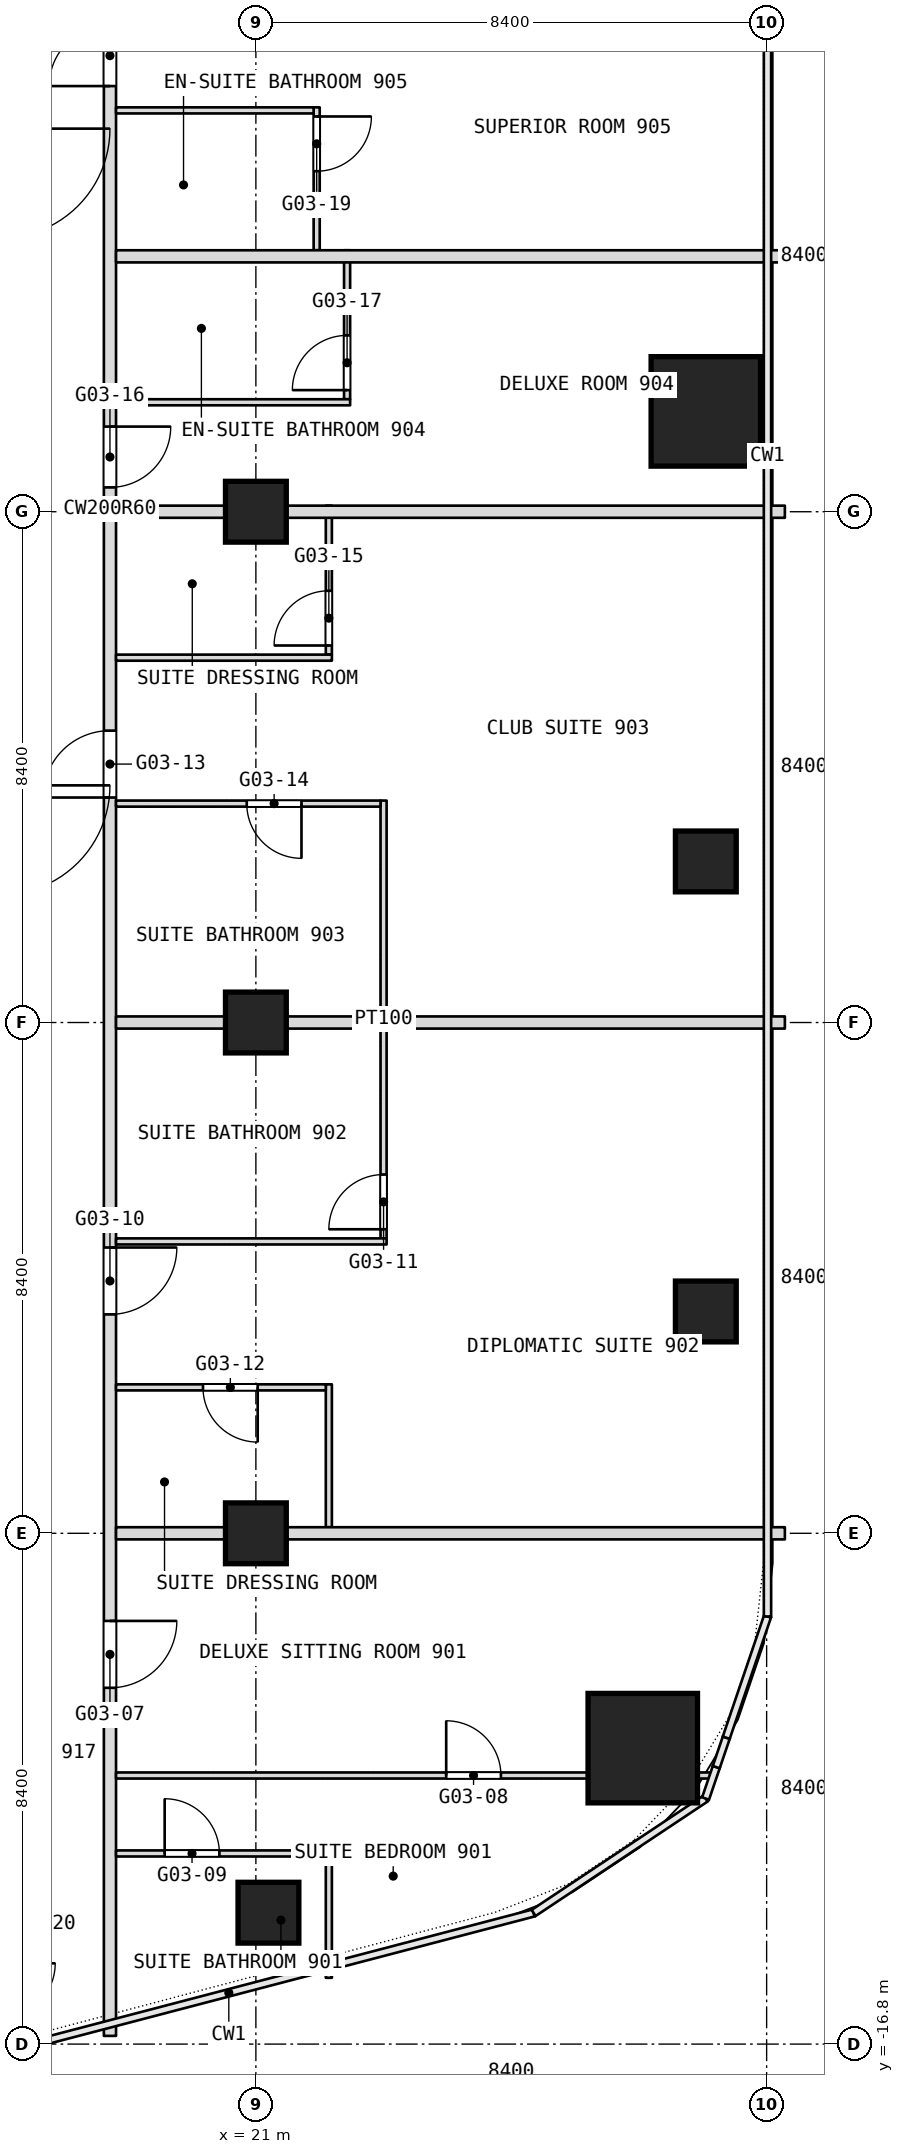
"""IFC4 building model, lengths in metres.
Left out: names, types, materials, properties, quantities, classifications, styles, units other than length and angle.
Written with IfcOpenShell. Run it as: python <this file> out.ifc"""

import sys

from ifc_helpers import new_model, si_unit, direction, frame, frame_2d, origin, origin_2d, place, context, subcontext, project, spatial, rectangle, extrude, element, fill, save


model = new_model("IFC4")
c1 = context("Model", 3, precision=1e-05, world=origin(), true_north=direction((0.0, 1.0)))
c2 = subcontext(c1, "Body", "Model", "MODEL_VIEW")
j1 = project(units=[si_unit("LENGTHUNIT", "METRE"), si_unit("PLANEANGLEUNIT", "RADIAN")], contexts=[c1])
p1 = place(None, origin())
s1 = spatial("IfcSite", under=j1, at=p1, CompositionType="ELEMENT")
p2 = place(p1, origin())
s2 = spatial("IfcBuilding", under=s1, at=p2, CompositionType="ELEMENT")
p3 = place(p2, frame((0.0, 0.0, 47.3)))
s3 = spatial("IfcBuildingStorey", under=s2, at=p3, CompositionType="ELEMENT", Elevation=47.3)
for number, where, z_axis, x_axis in (
    (1, (27.363, -11.933, 0.0), (0.0, 0.0, 1.0), (1.0, 0.0, 0.0)),
    (2, (28.4, 10.05, 0.0), (0.0, 0.0, 1.0), (1.0, 0.0, 0.0)),
):
    element("IfcColumn", number, at=place(p3, frame(where, z_axis=z_axis, x_axis=x_axis)), inside=s3, PredefinedType="COLUMN", context=c2, shape_type="SweptSolid", body=[
        extrude(rectangle(XDim=1.8, YDim=1.8, at=origin_2d()), origin(), (0.0, 0.0, 1.0), 3.6),
    ])
for number, where, z_axis, x_axis in (
    (3, (21.0, -8.4, 0.0), (0.0, 0.0, 1.0), (1.0, 0.0, 0.0)),
    (4, (21.0, 0.0, 0.0), (0.0, 0.0, 1.0), (1.0, 0.0, 0.0)),
    (5, (21.0, 8.4, 0.0), (0.0, 0.0, 1.0), (1.0, 0.0, 0.0)),
    (6, (28.4, 2.649, 0.0), (0.0, 0.0, 1.0), (1.0, 0.0, 0.0)),
    (7, (28.4, -4.752, 0.0), (0.0, 0.0, 1.0), (1.0, 0.0, 0.0)),
    (8, (21.207, -14.639, 0.0), (0.0, 0.0, 1.0), (1.0, 0.0, 0.0)),
):
    element("IfcColumn", number, at=place(p3, frame(where, z_axis=z_axis, x_axis=x_axis)), inside=s3, PredefinedType="COLUMN", context=c2, shape_type="SweptSolid", body=[
        extrude(rectangle(XDim=1.0, YDim=1.0, at=origin_2d()), origin(), (0.0, 0.0, 1.0), 3.6),
    ])
p4 = place(p3, frame((23.1, -3.55, 0.0), z_axis=(0.0, 0.0, 1.0), x_axis=(0.0, 1.0, 0.0)))
e9 = element("IfcWall", 9, at=p4, inside=s3, PredefinedType="PARTITIONING", context=c2, shape_type="SweptSolid", body=[
    extrude(rectangle(XDim=7.2, YDim=0.1, at=frame_2d((3.6, 0.0))), origin(), (0.0, 0.0, 1.0), 3.34),
])
p5 = place(p4, frame((0.15, 0.0, 0.0)))
e10 = element("IfcOpeningElement", 10, at=p5, cuts=e9, PredefinedType="OPENING", context=c2, shape_type="SweptSolid", body=[
    extrude(rectangle(XDim=0.9, YDim=2.1, at=frame_2d((0.45, 1.05))), frame((0.0, 0.05, 0.0), z_axis=(0.0, -1.0, 0.0), x_axis=(1.0, 0.0, 0.0)), (0.0, 0.0, 1.0), 0.1),
])
p6 = place(p3, frame((22.5, 10.25, 0.0), z_axis=(0.0, 0.0, 1.0), x_axis=(0.0, 1.0, 0.0)))
e11 = element("IfcWall", 11, at=p6, inside=s3, PredefinedType="PARTITIONING", context=c2, shape_type="SweptSolid", body=[
    extrude(rectangle(XDim=2.45, YDim=0.1, at=frame_2d((1.225, 0.0))), origin(), (0.0, 0.0, 1.0), 3.34),
])
p7 = place(p6, frame((0.15, 0.0, 0.0)))
e12 = element("IfcOpeningElement", 12, at=p7, cuts=e11, PredefinedType="OPENING", context=c2, shape_type="SweptSolid", body=[
    extrude(rectangle(XDim=0.9, YDim=2.1, at=frame_2d((0.45, 1.05))), frame((0.0, 0.05, 0.0), z_axis=(0.0, -1.0, 0.0), x_axis=(1.0, 0.0, 0.0)), (0.0, 0.0, 1.0), 0.1),
])
p8 = place(p3, frame((22.2, -15.71, 0.0), z_axis=(0.0, 0.0, 1.0), x_axis=(0.0, 1.0, 0.0)))
e13 = element("IfcWall", 13, at=p8, inside=s3, PredefinedType="PARTITIONING", context=c2, shape_type="SweptSolid", body=[
    extrude(rectangle(XDim=2.095, YDim=0.1, at=frame_2d((1.047, 0.0))), origin(), (0.0, 0.0, 1.0), 3.34),
])
p9 = place(p3, frame((22.2, -8.3, 0.0), z_axis=(0.0, 0.0, 1.0), x_axis=(0.0, 1.0, 0.0)))
e14 = element("IfcWall", 14, at=p9, inside=s3, PredefinedType="PARTITIONING", context=c2, shape_type="SweptSolid", body=[
    extrude(rectangle(XDim=2.35, YDim=0.1, at=frame_2d((1.175, 0.0))), origin(), (0.0, 0.0, 1.0), 3.34),
])
p10 = place(p3, frame((22.2, 6.05, 0.0), z_axis=(0.0, 0.0, 1.0), x_axis=(0.0, 1.0, 0.0)))
e15 = element("IfcWall", 15, at=p10, inside=s3, PredefinedType="PARTITIONING", context=c2, shape_type="SweptSolid", body=[
    extrude(rectangle(XDim=2.45, YDim=0.1, at=frame_2d((1.225, 0.0))), origin(), (0.0, 0.0, 1.0), 3.34),
])
p11 = place(p10, frame((0.15, 0.0, 0.0)))
e16 = element("IfcOpeningElement", 16, at=p11, cuts=e15, PredefinedType="OPENING", context=c2, shape_type="SweptSolid", body=[
    extrude(rectangle(XDim=0.9, YDim=2.1, at=frame_2d((0.45, 1.05))), frame((0.0, 0.05, 0.0), z_axis=(0.0, -1.0, 0.0), x_axis=(1.0, 0.0, 0.0)), (0.0, 0.0, 1.0), 0.1),
])
p12 = place(p3, frame((22.0, 12.7, 0.0), z_axis=(0.0, 0.0, 1.0), x_axis=(0.0, 1.0, 0.0)))
e17 = element("IfcWall", 17, at=p12, inside=s3, PredefinedType="PARTITIONING", context=c2, shape_type="SweptSolid", body=[
    extrude(rectangle(XDim=2.35, YDim=0.1, at=frame_2d((1.175, 0.0))), origin(), (0.0, 0.0, 1.0), 3.34),
])
p13 = place(p12, frame((1.3, 0.0, 0.0)))
e18 = element("IfcOpeningElement", 18, at=p13, cuts=e17, PredefinedType="OPENING", context=c2, shape_type="SweptSolid", body=[
    extrude(rectangle(XDim=0.9, YDim=2.1, at=frame_2d((0.45, 1.05))), frame((0.0, 0.05, 0.0), z_axis=(0.0, -1.0, 0.0), x_axis=(1.0, 0.0, 0.0)), (0.0, 0.0, 1.0), 0.1),
])
p14 = place(p3, frame((18.6, -16.665, 0.0), z_axis=(0.0, 0.0, 1.0), x_axis=(0.0, 1.0, 0.0)))
e19 = element("IfcWall", 19, at=p14, inside=s3, PredefinedType="PARTITIONING", context=c2, shape_type="SweptSolid", body=[
    extrude(rectangle(XDim=50.205, YDim=0.2, at=frame_2d((25.103, 0.0))), origin(), (0.0, 0.0, 1.0), 3.34),
])
p15 = place(p14, frame((5.724, 0.0, 0.0)))
e20 = element("IfcOpeningElement", 20, at=p15, cuts=e19, PredefinedType="OPENING", context=c2, shape_type="SweptSolid", body=[
    extrude(rectangle(XDim=1.1, YDim=2.1, at=frame_2d((0.55, 1.05))), frame((0.0, 0.1, 0.0), z_axis=(0.0, -1.0, 0.0), x_axis=(1.0, 0.0, 0.0)), (0.0, 0.0, 1.0), 0.2),
])
p16 = place(p14, frame((11.865, 0.0, 0.0)))
e21 = element("IfcOpeningElement", 21, at=p16, cuts=e19, PredefinedType="OPENING", context=c2, shape_type="SweptSolid", body=[
    extrude(rectangle(XDim=1.1, YDim=2.1, at=frame_2d((0.55, 1.05))), frame((0.0, 0.1, 0.0), z_axis=(0.0, -1.0, 0.0), x_axis=(1.0, 0.0, 0.0)), (0.0, 0.0, 1.0), 0.2),
])
p17 = place(p14, frame((20.365, 0.0, 0.0)))
e22 = element("IfcOpeningElement", 22, at=p17, cuts=e19, PredefinedType="OPENING", context=c2, shape_type="SweptSolid", body=[
    extrude(rectangle(XDim=1.1, YDim=2.1, at=frame_2d((0.55, 1.05))), frame((0.0, 0.1, 0.0), z_axis=(0.0, -1.0, 0.0), x_axis=(1.0, 0.0, 0.0)), (0.0, 0.0, 1.0), 0.2),
])
p18 = place(p14, frame((25.465, 0.0, 0.0)))
e23 = element("IfcOpeningElement", 23, at=p18, cuts=e19, PredefinedType="OPENING", context=c2, shape_type="SweptSolid", body=[
    extrude(rectangle(XDim=1.0, YDim=2.1, at=frame_2d((0.5, 1.05))), frame((0.0, 0.1, 0.0), z_axis=(0.0, -1.0, 0.0), x_axis=(1.0, 0.0, 0.0)), (0.0, 0.0, 1.0), 0.2),
])
p19 = place(p14, frame((32.065, 0.0, 0.0)))
e24 = element("IfcOpeningElement", 24, at=p19, cuts=e19, PredefinedType="OPENING", context=c2, shape_type="SweptSolid", body=[
    extrude(rectangle(XDim=1.0, YDim=2.1, at=frame_2d((0.5, 1.05))), frame((0.0, 0.1, 0.0), z_axis=(0.0, -1.0, 0.0), x_axis=(1.0, 0.0, 0.0)), (0.0, 0.0, 1.0), 0.2),
])
p20 = place(p14, frame((36.265, 0.0, 0.0)))
e25 = element("IfcOpeningElement", 25, at=p20, cuts=e19, PredefinedType="OPENING", context=c2, shape_type="SweptSolid", body=[
    extrude(rectangle(XDim=1.0, YDim=2.1, at=frame_2d((0.5, 1.05))), frame((0.0, 0.1, 0.0), z_axis=(0.0, -1.0, 0.0), x_axis=(1.0, 0.0, 0.0)), (0.0, 0.0, 1.0), 0.2),
])
p21 = place(p14, frame((38.065, 0.0, 0.0)))
e26 = element("IfcOpeningElement", 26, at=p21, cuts=e19, PredefinedType="OPENING", context=c2, shape_type="SweptSolid", body=[
    extrude(rectangle(XDim=1.0, YDim=2.1, at=frame_2d((0.5, 1.05))), frame((0.0, 0.1, 0.0), z_axis=(0.0, -1.0, 0.0), x_axis=(1.0, 0.0, 0.0)), (0.0, 0.0, 1.0), 0.2),
])
p22 = place(p14, frame((42.265, 0.0, 0.0)))
e27 = element("IfcOpeningElement", 27, at=p22, cuts=e19, PredefinedType="OPENING", context=c2, shape_type="SweptSolid", body=[
    extrude(rectangle(XDim=1.0, YDim=2.1, at=frame_2d((0.5, 1.05))), frame((0.0, 0.1, 0.0), z_axis=(0.0, -1.0, 0.0), x_axis=(1.0, 0.0, 0.0)), (0.0, 0.0, 1.0), 0.2),
])
p23 = place(p14, frame((47.465, 0.0, 0.0)))
e28 = element("IfcOpeningElement", 28, at=p23, cuts=e19, PredefinedType="OPENING", context=c2, shape_type="SweptSolid", body=[
    extrude(rectangle(XDim=1.0, YDim=2.1, at=frame_2d((0.5, 1.05))), frame((0.0, 0.1, 0.0), z_axis=(0.0, -1.0, 0.0), x_axis=(1.0, 0.0, 0.0)), (0.0, 0.0, 1.0), 0.2),
])
p24 = place(p3, frame((18.7, -13.665, 0.0), z_axis=(0.0, 0.0, 1.0), x_axis=(1.0, 0.0, 0.0)))
e29 = element("IfcWall", 29, at=p24, inside=s3, PredefinedType="PARTITIONING", context=c2, shape_type="SweptSolid", body=[
    extrude(rectangle(XDim=3.45, YDim=0.1, at=frame_2d((1.725, 0.0))), origin(), (0.0, 0.0, 1.0), 3.34),
])
p25 = place(p24, frame((0.8, 0.0, 0.0)))
e30 = element("IfcOpeningElement", 30, at=p25, cuts=e29, PredefinedType="OPENING", context=c2, shape_type="SweptSolid", body=[
    extrude(rectangle(XDim=0.9, YDim=2.1, at=frame_2d((0.45, 1.05))), frame((0.0, 0.05, 0.0), z_axis=(0.0, -1.0, 0.0), x_axis=(1.0, 0.0, 0.0)), (0.0, 0.0, 1.0), 0.1),
])
p26 = place(p3, frame((18.7, -12.383, 0.0), z_axis=(0.0, 0.0, 1.0), x_axis=(1.0, 0.0, 0.0)))
e31 = element("IfcWall", 31, at=p26, inside=s3, PredefinedType="PARTITIONING", context=c2, shape_type="SweptSolid", body=[
    extrude(rectangle(XDim=7.763, YDim=0.1, at=frame_2d((3.881, 0.0))), origin(), (0.0, 0.0, 1.0), 3.34),
])
p27 = place(p26, frame((5.43, 0.0, 0.0)))
e32 = element("IfcOpeningElement", 32, at=p27, cuts=e31, PredefinedType="OPENING", context=c2, shape_type="SweptSolid", body=[
    extrude(rectangle(XDim=0.9, YDim=2.1, at=frame_2d((0.45, 1.05))), frame((0.0, 0.05, 0.0), z_axis=(0.0, -1.0, 0.0), x_axis=(1.0, 0.0, 0.0)), (0.0, 0.0, 1.0), 0.1),
])
p28 = place(p3, frame((28.263, -12.383, 0.0), z_axis=(0.0, 0.0, 1.0), x_axis=(1.0, 0.0, 0.0)))
e33 = element("IfcWall", 33, at=p28, inside=s3, PredefinedType="PARTITIONING", context=c2, shape_type="SweptSolid", body=[
    extrude(rectangle(XDim=0.29, YDim=0.1, at=frame_2d((0.145, 0.0))), origin(), (0.0, 0.0, 1.0), 3.34),
])
p29 = place(p3, frame((18.7, -8.4, 0.0), z_axis=(0.0, 0.0, 1.0), x_axis=(1.0, 0.0, 0.0)))
e34 = element("IfcWall", 34, at=p29, inside=s3, PredefinedType="PARTITIONING", context=c2, shape_type="SweptSolid", body=[
    extrude(rectangle(XDim=11.0, YDim=0.2, at=frame_2d((5.5, 0.0))), origin(), (0.0, 0.0, 1.0), 2.84),
])
p30 = place(p3, frame((18.7, -6.0, 0.0), z_axis=(0.0, 0.0, 1.0), x_axis=(1.0, 0.0, 0.0)))
e35 = element("IfcWall", 35, at=p30, inside=s3, PredefinedType="PARTITIONING", context=c2, shape_type="SweptSolid", body=[
    extrude(rectangle(XDim=3.45, YDim=0.1, at=frame_2d((1.725, 0.0))), origin(), (0.0, 0.0, 1.0), 3.34),
])
p31 = place(p30, frame((1.43, 0.0, 0.0)))
e36 = element("IfcOpeningElement", 36, at=p31, cuts=e35, PredefinedType="OPENING", context=c2, shape_type="SweptSolid", body=[
    extrude(rectangle(XDim=0.9, YDim=2.1, at=frame_2d((0.45, 1.05))), frame((0.0, 0.05, 0.0), z_axis=(0.0, -1.0, 0.0), x_axis=(1.0, 0.0, 0.0)), (0.0, 0.0, 1.0), 0.1),
])
p32 = place(p3, frame((18.7, -3.6, 0.0), z_axis=(0.0, 0.0, 1.0), x_axis=(1.0, 0.0, 0.0)))
e37 = element("IfcWall", 37, at=p32, inside=s3, PredefinedType="PARTITIONING", context=c2, shape_type="SweptSolid", body=[
    extrude(rectangle(XDim=4.45, YDim=0.1, at=frame_2d((2.225, 0.0))), origin(), (0.0, 0.0, 1.0), 3.34),
])
p33 = place(p3, frame((18.7, 0.0, 0.0), z_axis=(0.0, 0.0, 1.0), x_axis=(1.0, 0.0, 0.0)))
e38 = element("IfcWall", 38, at=p33, inside=s3, PredefinedType="PARTITIONING", context=c2, shape_type="SweptSolid", body=[
    extrude(rectangle(XDim=11.0, YDim=0.2, at=frame_2d((5.5, 0.0))), origin(), (0.0, 0.0, 1.0), 2.84),
])
p34 = place(p3, frame((18.7, 3.6, 0.0), z_axis=(0.0, 0.0, 1.0), x_axis=(1.0, 0.0, 0.0)))
e39 = element("IfcWall", 39, at=p34, inside=s3, PredefinedType="PARTITIONING", context=c2, shape_type="SweptSolid", body=[
    extrude(rectangle(XDim=4.35, YDim=0.1, at=frame_2d((2.175, 0.0))), origin(), (0.0, 0.0, 1.0), 3.34),
])
p35 = place(p34, frame((2.15, 0.0, 0.0)))
e40 = element("IfcOpeningElement", 40, at=p35, cuts=e39, PredefinedType="OPENING", context=c2, shape_type="SweptSolid", body=[
    extrude(rectangle(XDim=0.9, YDim=2.1, at=frame_2d((0.45, 1.05))), frame((0.0, 0.05, 0.0), z_axis=(0.0, -1.0, 0.0), x_axis=(1.0, 0.0, 0.0)), (0.0, 0.0, 1.0), 0.1),
])
p36 = place(p3, frame((18.7, 6.0, 0.0), z_axis=(0.0, 0.0, 1.0), x_axis=(1.0, 0.0, 0.0)))
e41 = element("IfcWall", 41, at=p36, inside=s3, PredefinedType="PARTITIONING", context=c2, shape_type="SweptSolid", body=[
    extrude(rectangle(XDim=3.55, YDim=0.1, at=frame_2d((1.775, 0.0))), origin(), (0.0, 0.0, 1.0), 3.34),
])
p37 = place(p3, frame((18.7, 8.4, 0.0), z_axis=(0.0, 0.0, 1.0), x_axis=(1.0, 0.0, 0.0)))
e42 = element("IfcWall", 42, at=p37, inside=s3, PredefinedType="PARTITIONING", context=c2, shape_type="SweptSolid", body=[
    extrude(rectangle(XDim=11.0, YDim=0.2, at=frame_2d((5.5, 0.0))), origin(), (0.0, 0.0, 1.0), 2.84),
])
p38 = place(p3, frame((18.7, 10.2, 0.0), z_axis=(0.0, 0.0, 1.0), x_axis=(1.0, 0.0, 0.0)))
e43 = element("IfcWall", 43, at=p38, inside=s3, PredefinedType="PARTITIONING", context=c2, shape_type="SweptSolid", body=[
    extrude(rectangle(XDim=3.85, YDim=0.1, at=frame_2d((1.925, 0.0))), origin(), (0.0, 0.0, 1.0), 3.34),
])
p39 = place(p3, frame((18.7, 12.6, 0.0), z_axis=(0.0, 0.0, 1.0), x_axis=(1.0, 0.0, 0.0)))
e44 = element("IfcWall", 44, at=p39, inside=s3, PredefinedType="PARTITIONING", context=c2, shape_type="SweptSolid", body=[
    extrude(rectangle(XDim=11.0, YDim=0.2, at=frame_2d((5.5, 0.0))), origin(), (0.0, 0.0, 1.0), 3.34),
])
p40 = place(p3, frame((18.7, 15.0, 0.0), z_axis=(0.0, 0.0, 1.0), x_axis=(1.0, 0.0, 0.0)))
e45 = element("IfcWall", 45, at=p40, inside=s3, PredefinedType="PARTITIONING", context=c2, shape_type="SweptSolid", body=[
    extrude(rectangle(XDim=3.25, YDim=0.1, at=frame_2d((1.625, 0.0))), origin(), (0.0, 0.0, 1.0), 3.34),
])
p41 = place(p5, origin())
e46 = element("IfcDoor", 46, at=p41, inside=s3, OperationType="SINGLE_SWING_LEFT", PredefinedType="DOOR", context=c2, shape_type="SweptSolid", body=[
    extrude(rectangle(XDim=0.9, YDim=2.1, at=frame_2d((0.45, 1.05))), frame((0.0, 0.025, 0.0), z_axis=(0.0, -1.0, 0.0), x_axis=(1.0, 0.0, 0.0)), (0.0, 0.0, 1.0), 0.05),
])
fill(e10, e46)
p42 = place(p7, origin())
e47 = element("IfcDoor", 47, at=p42, inside=s3, OperationType="SINGLE_SWING_LEFT", PredefinedType="DOOR", context=c2, shape_type="SweptSolid", body=[
    extrude(rectangle(XDim=0.9, YDim=2.1, at=frame_2d((0.45, 1.05))), frame((0.0, 0.025, 0.0), z_axis=(0.0, -1.0, 0.0), x_axis=(1.0, 0.0, 0.0)), (0.0, 0.0, 1.0), 0.05),
])
fill(e12, e47)
p43 = place(p11, origin())
e48 = element("IfcDoor", 48, at=p43, inside=s3, OperationType="SINGLE_SWING_LEFT", PredefinedType="DOOR", context=c2, shape_type="SweptSolid", body=[
    extrude(rectangle(XDim=0.9, YDim=2.1, at=frame_2d((0.45, 1.05))), frame((0.0, 0.025, 0.0), z_axis=(0.0, -1.0, 0.0), x_axis=(1.0, 0.0, 0.0)), (0.0, 0.0, 1.0), 0.05),
])
fill(e16, e48)
p44 = place(p13, origin())
e49 = element("IfcDoor", 49, at=p44, inside=s3, OperationType="SINGLE_SWING_RIGHT", PredefinedType="DOOR", context=c2, shape_type="SweptSolid", body=[
    extrude(rectangle(XDim=0.9, YDim=2.1, at=frame_2d((0.45, 1.05))), frame((0.0, 0.025, 0.0), z_axis=(0.0, -1.0, 0.0), x_axis=(1.0, 0.0, 0.0)), (0.0, 0.0, 1.0), 0.05),
])
fill(e18, e49)
p45 = place(p15, origin())
e50 = element("IfcDoor", 50, at=p45, inside=s3, OperationType="SINGLE_SWING_LEFT", PredefinedType="DOOR", context=c2, shape_type="SweptSolid", body=[
    extrude(rectangle(XDim=1.1, YDim=2.1, at=frame_2d((0.55, 1.05))), frame((0.0, 0.025, 0.0), z_axis=(0.0, -1.0, 0.0), x_axis=(1.0, 0.0, 0.0)), (0.0, 0.0, 1.0), 0.05),
])
fill(e20, e50)
p46 = place(p16, origin())
e51 = element("IfcDoor", 51, at=p46, inside=s3, OperationType="SINGLE_SWING_LEFT", PredefinedType="DOOR", context=c2, shape_type="SweptSolid", body=[
    extrude(rectangle(XDim=1.1, YDim=2.1, at=frame_2d((0.55, 1.05))), frame((0.0, 0.025, 0.0), z_axis=(0.0, -1.0, 0.0), x_axis=(1.0, 0.0, 0.0)), (0.0, 0.0, 1.0), 0.05),
])
fill(e21, e51)
p47 = place(p17, origin())
e52 = element("IfcDoor", 52, at=p47, inside=s3, OperationType="SINGLE_SWING_RIGHT", PredefinedType="DOOR", context=c2, shape_type="SweptSolid", body=[
    extrude(rectangle(XDim=1.1, YDim=2.1, at=frame_2d((0.55, 1.05))), frame((0.0, 0.025, 0.0), z_axis=(0.0, -1.0, 0.0), x_axis=(1.0, 0.0, 0.0)), (0.0, 0.0, 1.0), 0.05),
])
fill(e22, e52)
p48 = place(p18, origin())
e53 = element("IfcDoor", 53, at=p48, inside=s3, OperationType="SINGLE_SWING_RIGHT", PredefinedType="DOOR", context=c2, shape_type="SweptSolid", body=[
    extrude(rectangle(XDim=1.0, YDim=2.1, at=frame_2d((0.5, 1.05))), frame((0.0, 0.025, 0.0), z_axis=(0.0, -1.0, 0.0), x_axis=(1.0, 0.0, 0.0)), (0.0, 0.0, 1.0), 0.05),
])
fill(e23, e53)
p49 = place(p19, origin())
e54 = element("IfcDoor", 54, at=p49, inside=s3, OperationType="SINGLE_SWING_RIGHT", PredefinedType="DOOR", context=c2, shape_type="SweptSolid", body=[
    extrude(rectangle(XDim=1.0, YDim=2.1, at=frame_2d((0.5, 1.05))), frame((0.0, 0.025, 0.0), z_axis=(0.0, -1.0, 0.0), x_axis=(1.0, 0.0, 0.0)), (0.0, 0.0, 1.0), 0.05),
])
fill(e24, e54)
p50 = place(p25, origin())
e55 = element("IfcDoor", 55, at=p50, inside=s3, OperationType="SINGLE_SWING_LEFT", PredefinedType="DOOR", context=c2, shape_type="SweptSolid", body=[
    extrude(rectangle(XDim=0.9, YDim=2.1, at=frame_2d((0.45, 1.05))), frame((0.0, 0.025, 0.0), z_axis=(0.0, -1.0, 0.0), x_axis=(1.0, 0.0, 0.0)), (0.0, 0.0, 1.0), 0.05),
])
fill(e30, e55)
p51 = place(p27, origin())
e56 = element("IfcDoor", 56, at=p51, inside=s3, OperationType="SINGLE_SWING_LEFT", PredefinedType="DOOR", context=c2, shape_type="SweptSolid", body=[
    extrude(rectangle(XDim=0.9, YDim=2.1, at=frame_2d((0.45, 1.05))), frame((0.0, 0.025, 0.0), z_axis=(0.0, -1.0, 0.0), x_axis=(1.0, 0.0, 0.0)), (0.0, 0.0, 1.0), 0.05),
])
fill(e32, e56)
p52 = place(p31, origin())
e57 = element("IfcDoor", 57, at=p52, inside=s3, OperationType="SINGLE_SWING_LEFT", PredefinedType="DOOR", context=c2, shape_type="SweptSolid", body=[
    extrude(rectangle(XDim=0.9, YDim=2.1, at=frame_2d((0.45, 1.05))), frame((0.0, 0.025, 0.0), z_axis=(0.0, -1.0, 0.0), x_axis=(1.0, 0.0, 0.0)), (0.0, 0.0, 1.0), 0.05),
])
fill(e36, e57)
p53 = place(p35, origin())
e58 = element("IfcDoor", 58, at=p53, inside=s3, OperationType="SINGLE_SWING_LEFT", PredefinedType="DOOR", context=c2, shape_type="SweptSolid", body=[
    extrude(rectangle(XDim=0.9, YDim=2.1, at=frame_2d((0.45, 1.05))), frame((0.0, 0.025, 0.0), z_axis=(0.0, -1.0, 0.0), x_axis=(1.0, 0.0, 0.0)), (0.0, 0.0, 1.0), 0.05),
])
fill(e40, e58)
save(model, sys.argv[1])
